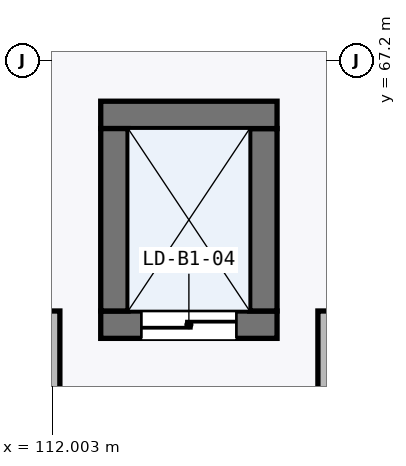
"""IFC4 building model, lengths in metres.
Left out: names, types, materials, properties, quantities, classifications, styles, units other than length and angle.
Written with IfcOpenShell. Run it as: python <this file> out.ifc"""

import sys

from ifc_helpers import new_model, si_unit, direction, frame, frame_2d, origin, place, context, subcontext, project, spatial, rectangle, extrude, element, fill, save


model = new_model("IFC4")
c1 = context("Model", 3, precision=1e-05, world=origin(), true_north=direction((0.0, 1.0)))
c2 = subcontext(c1, "Body", "Model", "MODEL_VIEW")
j1 = project(units=[si_unit("LENGTHUNIT", "METRE"), si_unit("PLANEANGLEUNIT", "RADIAN")], contexts=[c1])
p1 = place(None, origin())
s1 = spatial("IfcSite", under=j1, at=p1, CompositionType="ELEMENT")
p2 = place(p1, origin())
s2 = spatial("IfcBuilding", under=s1, at=p2, CompositionType="ELEMENT")
p3 = place(p2, frame((0.0, 0.0, -5.4)))
s3 = spatial("IfcBuildingStorey", under=s2, at=p3, CompositionType="ELEMENT", Elevation=-5.4)
p4 = place(p3, frame((112.64, 63.72, 0.0), z_axis=(0.0, 0.0, 1.0), x_axis=(1.0, 0.0, 0.0)))
e1 = element("IfcWall", 1, at=p4, inside=s3, PredefinedType="SHEAR", context=c2, shape_type="SweptSolid", body=[
    extrude(rectangle(XDim=2.32, YDim=0.36, at=frame_2d((1.16, 0.0))), origin(), (0.0, 0.0, 1.0), 5.145),
])
p5 = place(p4, frame((0.535, 0.0, 0.0)))
e2 = element("IfcOpeningElement", 2, at=p5, cuts=e1, PredefinedType="OPENING", context=c2, shape_type="SweptSolid", body=[
    extrude(rectangle(XDim=1.25, YDim=2.2, at=frame_2d((0.625, 1.1))), frame((0.0, 0.19, 0.0), z_axis=(0.0, -1.0, 0.0), x_axis=(1.0, 0.0, 0.0)), (0.0, 0.0, 1.0), 0.38),
])
p6 = place(p3, frame((114.78, 63.9, 0.0), z_axis=(0.0, 0.0, 1.0), x_axis=(0.0, 1.0, 0.0)))
e3 = element("IfcWall", 3, at=p6, inside=s3, PredefinedType="SHEAR", context=c2, shape_type="SweptSolid", body=[
    extrude(rectangle(XDim=2.4, YDim=0.36, at=frame_2d((1.2, 0.0))), origin(), (0.0, 0.0, 1.0), 5.145),
])
p7 = place(p3, frame((114.96, 66.48, 0.0), z_axis=(0.0, 0.0, 1.0), x_axis=(-1.0, 0.0, 0.0)))
e4 = element("IfcWall", 4, at=p7, inside=s3, PredefinedType="SHEAR", context=c2, shape_type="SweptSolid", body=[
    extrude(rectangle(XDim=2.32, YDim=0.36, at=frame_2d((1.16, 0.0))), origin(), (0.0, 0.0, 1.0), 5.145),
])
p8 = place(p3, frame((112.82, 66.3, 0.0), z_axis=(0.0, 0.0, 1.0), x_axis=(0.0, -1.0, 0.0)))
e5 = element("IfcWall", 5, at=p8, inside=s3, PredefinedType="SHEAR", context=c2, shape_type="SweptSolid", body=[
    extrude(rectangle(XDim=2.4, YDim=0.36, at=frame_2d((1.2, 0.0))), origin(), (0.0, 0.0, 1.0), 5.145),
])
for number, where, z_axis, x_axis in (
    (6, (115.6, 59.397, 0.0), (0.0, 0.0, 1.0), (0.0, 1.0, 0.0)),
    (7, (112.0, 63.9, 0.0), (0.0, 0.0, 1.0), (0.0, -1.0, 0.0)),
):
    element("IfcWall", number, at=place(p3, frame(where, z_axis=z_axis, x_axis=x_axis)), inside=s3, PredefinedType="PARTITIONING", context=c2, shape_type="SweptSolid", body=[
        extrude(rectangle(XDim=4.502, YDim=0.205, at=frame_2d((2.251, 0.0))), origin(), (0.0, 0.0, 1.0), 5.145),
    ])
p9 = place(p5, frame((1.25, 0.0, 0.0), z_axis=(0.0, 0.0, 1.0), x_axis=(-1.0, 0.0, 0.0)))
e8 = element("IfcDoor", 8, at=p9, inside=s3, OperationType="DOUBLE_DOOR_SLIDING", PredefinedType="DOOR", context=c2, shape_type="SweptSolid", body=[
    extrude(rectangle(XDim=1.25, YDim=2.2, at=frame_2d((0.625, 1.1))), frame((0.0, 0.025, 0.0), z_axis=(0.0, -1.0, 0.0), x_axis=(1.0, 0.0, 0.0)), (0.0, 0.0, 1.0), 0.05),
])
fill(e2, e8)
save(model, sys.argv[1])
